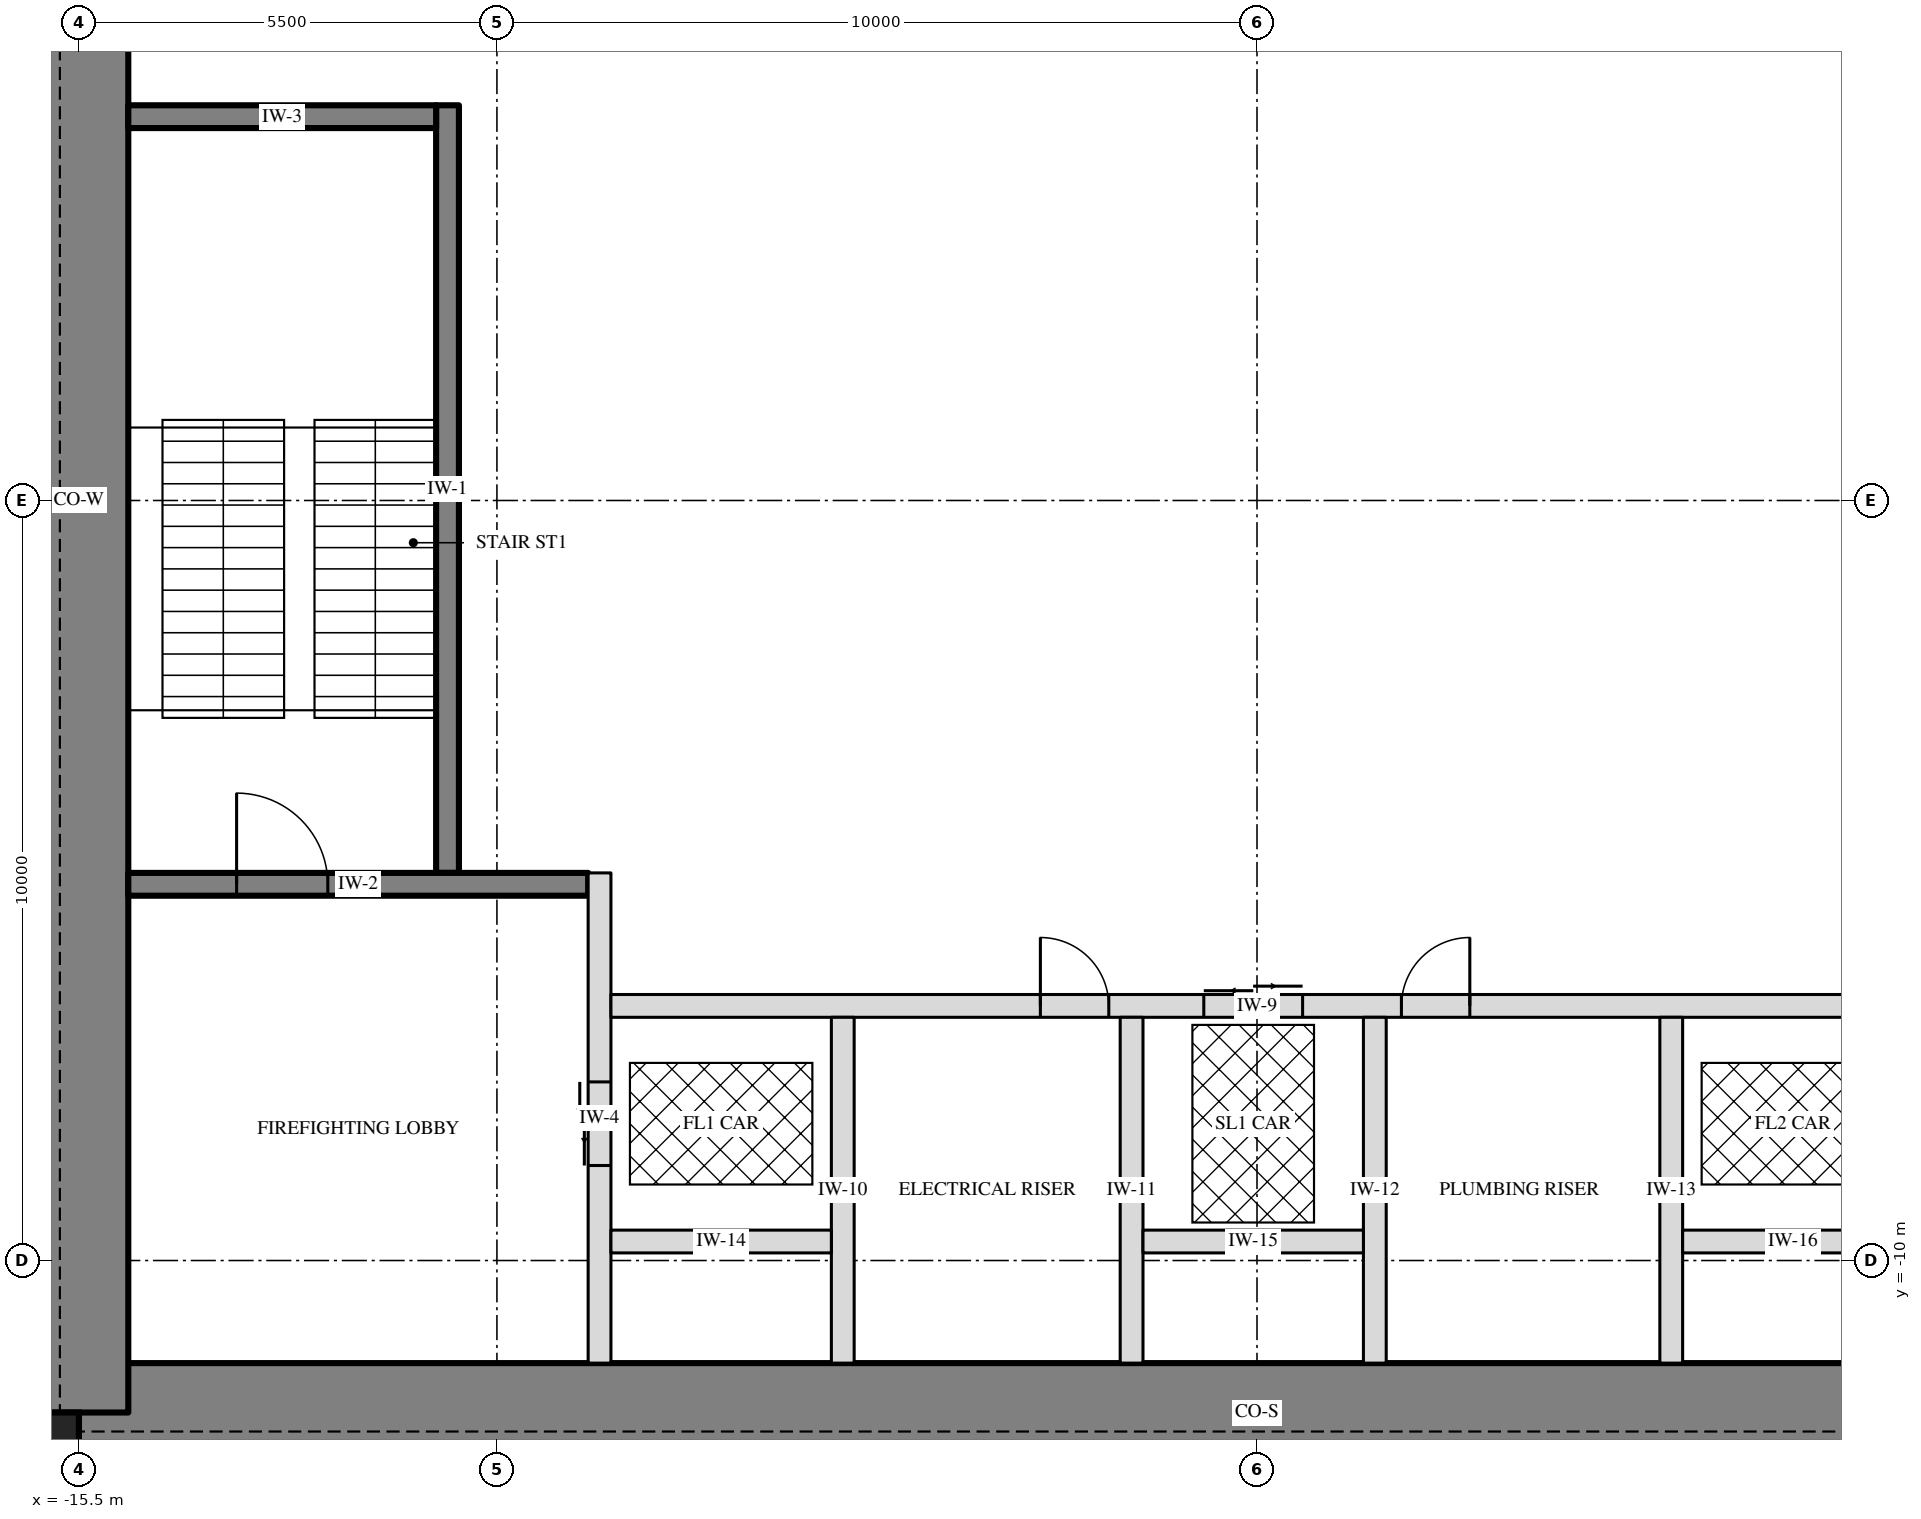
"""IFC4 building model, lengths in metres.
Left out: names, types, materials, properties, quantities, classifications, styles, units other than length and angle.
Written with IfcOpenShell. Run it as: python <this file> out.ifc"""

import sys

from ifc_helpers import new_model, si_unit, direction, frame, frame_2d, origin, origin_2d, place, context, subcontext, project, spatial, rectangle, extrude, element, fill, save


model = new_model("IFC4")
c1 = context("Model", 3, precision=1e-05, world=origin(), true_north=direction((0.0, 1.0)))
c2 = subcontext(c1, "Body", "Model", "MODEL_VIEW")
j1 = project(units=[si_unit("LENGTHUNIT", "METRE"), si_unit("PLANEANGLEUNIT", "RADIAN")], contexts=[c1])
p1 = place(None, origin())
s1 = spatial("IfcSite", under=j1, at=p1, CompositionType="ELEMENT")
p2 = place(p1, origin())
s2 = spatial("IfcBuilding", under=s1, at=p2, CompositionType="ELEMENT")
p3 = place(p2, frame((0.0, 0.0, 353.25)))
s3 = spatial("IfcBuildingStorey", under=s2, at=p3, CompositionType="ELEMENT", Elevation=353.25)
p4 = place(p3, frame((-15.5, -12.0, -0.3), z_axis=(0.0, 0.0, 1.0), x_axis=(1.0, 0.0, 0.0)))
e1 = element("IfcWall", 1, at=p4, inside=s3, PredefinedType="SHEAR", context=c2, shape_type="SweptSolid", body=[
    extrude(rectangle(XDim=31.0, YDim=1.3, at=frame_2d((15.5, 0.0))), origin(), (0.0, 0.0, 1.0), 5.0),
])
p5 = place(p3, frame((-15.5, -12.0, -0.3), z_axis=(0.0, 0.0, 1.0), x_axis=(0.0, 1.0, 0.0)))
e2 = element("IfcWall", 2, at=p5, inside=s3, PredefinedType="SHEAR", context=c2, shape_type="SweptSolid", body=[
    extrude(rectangle(XDim=24.0, YDim=1.3, at=frame_2d((12.0, 0.0))), origin(), (0.0, 0.0, 1.0), 5.0),
])
p6 = place(p5, frame((2.675, 0.0, 0.3)))
e3 = element("IfcOpeningElement", 3, at=p6, cuts=e2, PredefinedType="OPENING", context=c2, shape_type="SweptSolid", body=[
    extrude(rectangle(XDim=1.2, YDim=2.1, at=frame_2d((0.6, 1.05))), frame((0.0, 0.66, 0.0), z_axis=(0.0, -1.0, 0.0), x_axis=(1.0, 0.0, 0.0)), (0.0, 0.0, 1.0), 1.32),
])
p7 = place(p5, frame((20.125, 0.0, 0.3)))
e4 = element("IfcOpeningElement", 4, at=p7, cuts=e2, PredefinedType="OPENING", context=c2, shape_type="SweptSolid", body=[
    extrude(rectangle(XDim=1.8, YDim=2.1, at=frame_2d((0.9, 1.05))), frame((0.0, 0.66, 0.0), z_axis=(0.0, -1.0, 0.0), x_axis=(1.0, 0.0, 0.0)), (0.0, 0.0, 1.0), 1.32),
])
p8 = place(p3, frame((-15.825, -12.325, -0.3), z_axis=(0.0, 0.0, 1.0), x_axis=(1.0, 0.0, 0.0)))
e5 = element("IfcColumn", 5, at=p8, inside=s3, PredefinedType="COLUMN", context=c2, shape_type="SweptSolid", body=[
    extrude(rectangle(XDim=0.65, YDim=0.65, at=origin_2d()), origin(), (0.0, 0.0, 1.0), 5.0),
])
p9 = place(p3, frame((-10.65, -4.9, 0.0), z_axis=(0.0, 0.0, 1.0), x_axis=(0.0, 1.0, 0.0)))
e6 = element("IfcWall", 6, at=p9, inside=s3, PredefinedType="SOLIDWALL", context=c2, shape_type="SweptSolid", body=[
    extrude(rectangle(XDim=10.1, YDim=0.3, at=frame_2d((5.05, 0.0))), origin(), (0.0, 0.0, 1.0), 4.7),
])
p10 = place(p3, frame((-14.85, -5.05, 0.0), z_axis=(0.0, 0.0, 1.0), x_axis=(1.0, 0.0, 0.0)))
e7 = element("IfcWall", 7, at=p10, inside=s3, PredefinedType="SOLIDWALL", context=c2, shape_type="SweptSolid", body=[
    extrude(rectangle(XDim=6.05, YDim=0.3, at=frame_2d((3.025, 0.0))), origin(), (0.0, 0.0, 1.0), 4.7),
])
p11 = place(p10, frame((1.425, 0.0, 0.0)))
e8 = element("IfcOpeningElement", 8, at=p11, cuts=e7, PredefinedType="OPENING", context=c2, shape_type="SweptSolid", body=[
    extrude(rectangle(XDim=1.2, YDim=2.1, at=frame_2d((0.6, 1.05))), frame((0.0, 0.16, 0.0), z_axis=(0.0, -1.0, 0.0), x_axis=(1.0, 0.0, 0.0)), (0.0, 0.0, 1.0), 0.32),
])
p12 = place(p3, frame((-14.85, 5.05, 0.0), z_axis=(0.0, 0.0, 1.0), x_axis=(1.0, 0.0, 0.0)))
e9 = element("IfcWall", 9, at=p12, inside=s3, PredefinedType="SOLIDWALL", context=c2, shape_type="SweptSolid", body=[
    extrude(rectangle(XDim=4.05, YDim=0.3, at=frame_2d((2.025, 0.0))), origin(), (0.0, 0.0, 1.0), 4.7),
])
p13 = place(p3, frame((-8.65, -11.35, 0.0), z_axis=(0.0, 0.0, 1.0), x_axis=(0.0, 1.0, 0.0)))
e10 = element("IfcWall", 10, at=p13, inside=s3, PredefinedType="PARTITIONING", context=c2, shape_type="SweptSolid", body=[
    extrude(rectangle(XDim=6.45, YDim=0.3, at=frame_2d((3.225, 0.0))), origin(), (0.0, 0.0, 1.0), 4.7),
])
p14 = place(p13, frame((2.6, 0.0, 0.0)))
e11 = element("IfcOpeningElement", 11, at=p14, cuts=e10, PredefinedType="OPENING", context=c2, shape_type="SweptSolid", body=[
    extrude(rectangle(XDim=1.1, YDim=2.1, at=frame_2d((0.55, 1.05))), frame((0.0, 0.16, 0.0), z_axis=(0.0, -1.0, 0.0), x_axis=(1.0, 0.0, 0.0)), (0.0, 0.0, 1.0), 0.32),
])
p15 = place(p3, frame((-8.5, -6.65, 0.0), z_axis=(0.0, 0.0, 1.0), x_axis=(1.0, 0.0, 0.0)))
e12 = element("IfcWall", 12, at=p15, inside=s3, PredefinedType="PARTITIONING", context=c2, shape_type="SweptSolid", body=[
    extrude(rectangle(XDim=17.0, YDim=0.3, at=frame_2d((8.5, 0.0))), origin(), (0.0, 0.0, 1.0), 4.7),
])
p16 = place(p15, frame((7.8, 0.0, 0.0)))
e13 = element("IfcOpeningElement", 13, at=p16, cuts=e12, PredefinedType="OPENING", context=c2, shape_type="SweptSolid", body=[
    extrude(rectangle(XDim=1.3, YDim=2.4, at=frame_2d((0.65, 1.2))), frame((0.0, 0.16, 0.0), z_axis=(0.0, -1.0, 0.0), x_axis=(1.0, 0.0, 0.0)), (0.0, 0.0, 1.0), 0.32),
])
p17 = place(p15, frame((5.65, 0.0, 0.0)))
e14 = element("IfcOpeningElement", 14, at=p17, cuts=e12, PredefinedType="OPENING", context=c2, shape_type="SweptSolid", body=[
    extrude(rectangle(XDim=0.9, YDim=2.1, at=frame_2d((0.45, 1.05))), frame((0.0, 0.16, 0.0), z_axis=(0.0, -1.0, 0.0), x_axis=(1.0, 0.0, 0.0)), (0.0, 0.0, 1.0), 0.32),
])
p18 = place(p15, frame((10.4, 0.0, 0.0)))
e15 = element("IfcOpeningElement", 15, at=p18, cuts=e12, PredefinedType="OPENING", context=c2, shape_type="SweptSolid", body=[
    extrude(rectangle(XDim=0.9, YDim=2.1, at=frame_2d((0.45, 1.05))), frame((0.0, 0.16, 0.0), z_axis=(0.0, -1.0, 0.0), x_axis=(1.0, 0.0, 0.0)), (0.0, 0.0, 1.0), 0.32),
])
for number, where, z_axis, x_axis in (
    (16, (-5.45, -11.35, 0.0), (0.0, 0.0, 1.0), (0.0, 1.0, 0.0)),
    (17, (-1.65, -11.35, 0.0), (0.0, 0.0, 1.0), (0.0, 1.0, 0.0)),
    (18, (1.55, -11.35, 0.0), (0.0, 0.0, 1.0), (0.0, 1.0, 0.0)),
    (19, (5.45, -11.35, 0.0), (0.0, 0.0, 1.0), (0.0, 1.0, 0.0)),
):
    element("IfcWall", number, at=place(p3, frame(where, z_axis=z_axis, x_axis=x_axis)), inside=s3, PredefinedType="PARTITIONING", context=c2, shape_type="SweptSolid", body=[
        extrude(rectangle(XDim=4.55, YDim=0.3, at=frame_2d((2.275, 0.0))), origin(), (0.0, 0.0, 1.0), 4.7),
    ])
for number, where, z_axis, x_axis in (
    (20, (-8.5, -9.75, 0.0), (0.0, 0.0, 1.0), (1.0, 0.0, 0.0)),
    (21, (-1.5, -9.75, 0.0), (0.0, 0.0, 1.0), (1.0, 0.0, 0.0)),
    (22, (5.6, -9.75, 0.0), (0.0, 0.0, 1.0), (1.0, 0.0, 0.0)),
):
    element("IfcWall", number, at=place(p3, frame(where, z_axis=z_axis, x_axis=x_axis)), inside=s3, PredefinedType="PARTITIONING", context=c2, shape_type="SweptSolid", body=[
        extrude(rectangle(XDim=2.9, YDim=0.3, at=frame_2d((1.45, 0.0))), origin(), (0.0, 0.0, 1.0), 4.7),
    ])
p19 = place(p3, frame((-4.7, 5.45, 0.0), z_axis=(0.0, 0.0, 1.0), x_axis=(1.0, 0.0, 0.0)))
e23 = element("IfcWall", 23, at=p19, inside=s3, PredefinedType="PARTITIONING", context=c2, shape_type="SweptSolid", body=[
    extrude(rectangle(XDim=9.7, YDim=0.3, at=frame_2d((4.85, 0.0))), origin(), (0.0, 0.0, 1.0), 4.7),
])
for number, where, z_axis, x_axis in (
    (24, (-4.55, 5.6, 0.0), (0.0, 0.0, 1.0), (0.0, 1.0, 0.0)),
    (25, (4.85, 5.6, 0.0), (0.0, 0.0, 1.0), (0.0, 1.0, 0.0)),
):
    element("IfcWall", number, at=place(p3, frame(where, z_axis=z_axis, x_axis=x_axis)), inside=s3, PredefinedType="PARTITIONING", context=c2, shape_type="SweptSolid", body=[
        extrude(rectangle(XDim=2.8, YDim=0.3, at=frame_2d((1.4, 0.0))), origin(), (0.0, 0.0, 1.0), 4.7),
    ])
for number, where, z_axis, x_axis in (
    (26, (-1.4, 5.6, 0.0), (0.0, 0.0, 1.0), (0.0, 1.0, 0.0)),
    (27, (1.7, 5.6, 0.0), (0.0, 0.0, 1.0), (0.0, 1.0, 0.0)),
):
    element("IfcWall", number, at=place(p3, frame(where, z_axis=z_axis, x_axis=x_axis)), inside=s3, PredefinedType="PARTITIONING", context=c2, shape_type="SweptSolid", body=[
        extrude(rectangle(XDim=2.8, YDim=0.2, at=frame_2d((1.4, 0.0))), origin(), (0.0, 0.0, 1.0), 4.7),
    ])
p20 = place(p3, frame((-10.65, 2.0, 0.0), z_axis=(0.0, 0.0, 1.0), x_axis=(1.0, 0.0, 0.0)))
e28 = element("IfcWall", 28, at=p20, inside=s3, PredefinedType="PARTITIONING", context=c2, shape_type="SweptSolid", body=[
    extrude(rectangle(XDim=21.3, YDim=0.3, at=frame_2d((10.65, 0.0))), origin(), (0.0, 0.0, 1.0), 4.7),
])
p21 = place(p20, frame((10.05, 0.0, 0.0)))
e29 = element("IfcOpeningElement", 29, at=p21, cuts=e28, PredefinedType="OPENING", context=c2, shape_type="SweptSolid", body=[
    extrude(rectangle(XDim=1.2, YDim=2.1, at=frame_2d((0.6, 1.05))), frame((0.0, 0.16, 0.0), z_axis=(0.0, -1.0, 0.0), x_axis=(1.0, 0.0, 0.0)), (0.0, 0.0, 1.0), 0.32),
])
p22 = place(p20, frame((18.942, 0.0, 0.0)))
e30 = element("IfcOpeningElement", 30, at=p22, cuts=e28, PredefinedType="OPENING", context=c2, shape_type="SweptSolid", body=[
    extrude(rectangle(XDim=0.9, YDim=2.1, at=frame_2d((0.45, 1.05))), frame((0.0, 0.16, 0.0), z_axis=(0.0, -1.0, 0.0), x_axis=(1.0, 0.0, 0.0)), (0.0, 0.0, 1.0), 0.32),
])
p23 = place(p3, frame((-3.3, -6.65, 0.0), z_axis=(0.0, 0.0, 1.0), x_axis=(0.0, 1.0, 0.0)))
e31 = element("IfcWall", 31, at=p23, inside=s3, PredefinedType="PARTITIONING", context=c2, shape_type="SweptSolid", body=[
    extrude(rectangle(XDim=8.65, YDim=0.3, at=frame_2d((4.325, 0.0))), origin(), (0.0, 0.0, 1.0), 4.7),
])
p24 = place(p23, frame((1.75, 0.0, 0.0)))
e32 = element("IfcOpeningElement", 32, at=p24, cuts=e31, PredefinedType="OPENING", context=c2, shape_type="SweptSolid", body=[
    extrude(rectangle(XDim=0.9, YDim=2.1, at=frame_2d((0.45, 1.05))), frame((0.0, 0.16, 0.0), z_axis=(0.0, -1.0, 0.0), x_axis=(1.0, 0.0, 0.0)), (0.0, 0.0, 1.0), 0.32),
])
p25 = place(p23, frame((6.075, 0.0, 0.0)))
e33 = element("IfcOpeningElement", 33, at=p25, cuts=e31, PredefinedType="OPENING", context=c2, shape_type="SweptSolid", body=[
    extrude(rectangle(XDim=0.9, YDim=2.1, at=frame_2d((0.45, 1.05))), frame((0.0, 0.16, 0.0), z_axis=(0.0, -1.0, 0.0), x_axis=(1.0, 0.0, 0.0)), (0.0, 0.0, 1.0), 0.32),
])
p26 = place(p3, frame((3.3, -6.65, 0.0), z_axis=(0.0, 0.0, 1.0), x_axis=(0.0, 1.0, 0.0)))
e34 = element("IfcWall", 34, at=p26, inside=s3, PredefinedType="PARTITIONING", context=c2, shape_type="SweptSolid", body=[
    extrude(rectangle(XDim=8.65, YDim=0.3, at=frame_2d((4.325, 0.0))), origin(), (0.0, 0.0, 1.0), 4.7),
])
p27 = place(p26, frame((3.875, 0.0, 0.0)))
e35 = element("IfcOpeningElement", 35, at=p27, cuts=e34, PredefinedType="OPENING", context=c2, shape_type="SweptSolid", body=[
    extrude(rectangle(XDim=0.9, YDim=2.1, at=frame_2d((0.45, 1.05))), frame((0.0, 0.16, 0.0), z_axis=(0.0, -1.0, 0.0), x_axis=(1.0, 0.0, 0.0)), (0.0, 0.0, 1.0), 0.32),
])
p28 = place(p3, frame((-10.65, -2.25, 0.0), z_axis=(0.0, 0.0, 1.0), x_axis=(1.0, 0.0, 0.0)))
e36 = element("IfcWall", 36, at=p28, inside=s3, PredefinedType="PARTITIONING", context=c2, shape_type="SweptSolid", body=[
    extrude(rectangle(XDim=7.35, YDim=0.3, at=frame_2d((3.675, 0.0))), origin(), (0.0, 0.0, 1.0), 4.7),
])
p29 = place(p3, frame((6.834, -6.65, 0.0), z_axis=(0.0, 0.0, 1.0), x_axis=(0.0, 1.0, 0.0)))
e37 = element("IfcWall", 37, at=p29, inside=s3, PredefinedType="PARTITIONING", context=c2, shape_type="SweptSolid", body=[
    extrude(rectangle(XDim=8.65, YDim=0.3, at=frame_2d((4.325, 0.0))), origin(), (0.0, 0.0, 1.0), 4.7),
])
p30 = place(p3, frame((-4.85, 5.3, 0.0), z_axis=(0.0, 0.0, 1.0), x_axis=(0.0, 1.0, 0.0)))
e38 = element("IfcWall", 38, at=p30, inside=s3, PredefinedType="PARTITIONING", context=c2, shape_type="SweptSolid", body=[
    extrude(rectangle(XDim=6.05, YDim=0.3, at=frame_2d((3.025, 0.0))), origin(), (0.0, 0.0, 1.0), 4.7),
])
p31 = place(p3, frame((5.15, 5.3, 0.0), z_axis=(0.0, 0.0, 1.0), x_axis=(0.0, 1.0, 0.0)))
e39 = element("IfcWall", 39, at=p31, inside=s3, PredefinedType="PARTITIONING", context=c2, shape_type="SweptSolid", body=[
    extrude(rectangle(XDim=6.05, YDim=0.3, at=frame_2d((3.025, 0.0))), origin(), (0.0, 0.0, 1.0), 4.7),
])
p32 = place(p31, frame((4.225, 0.0, 0.0)))
e40 = element("IfcOpeningElement", 40, at=p32, cuts=e39, PredefinedType="OPENING", context=c2, shape_type="SweptSolid", body=[
    extrude(rectangle(XDim=0.9, YDim=2.1, at=frame_2d((0.45, 1.05))), frame((0.0, 0.16, 0.0), z_axis=(0.0, -1.0, 0.0), x_axis=(1.0, 0.0, 0.0)), (0.0, 0.0, 1.0), 0.32),
])
p33 = place(p11, origin())
e41 = element("IfcDoor", 41, at=p33, inside=s3, OperationType="SINGLE_SWING_LEFT", PredefinedType="DOOR", context=c2, shape_type="SweptSolid", body=[
    extrude(rectangle(XDim=1.2, YDim=2.1, at=frame_2d((0.6, 1.05))), frame((0.0, 0.025, 0.0), z_axis=(0.0, -1.0, 0.0), x_axis=(1.0, 0.0, 0.0)), (0.0, 0.0, 1.0), 0.05),
])
fill(e8, e41)
p34 = place(p6, origin())
e42 = element("IfcDoor", 42, at=p34, inside=s3, OperationType="SINGLE_SWING_LEFT", PredefinedType="DOOR", context=c2, shape_type="SweptSolid", body=[
    extrude(rectangle(XDim=1.2, YDim=2.1, at=frame_2d((0.6, 1.05))), frame((0.0, 0.025, 0.0), z_axis=(0.0, -1.0, 0.0), x_axis=(1.0, 0.0, 0.0)), (0.0, 0.0, 1.0), 0.05),
])
fill(e3, e42)
p35 = place(p14, origin())
e43 = element("IfcDoor", 43, at=p35, inside=s3, OperationType="DOUBLE_DOOR_SLIDING", PredefinedType="DOOR", context=c2, shape_type="SweptSolid", body=[
    extrude(rectangle(XDim=1.1, YDim=2.1, at=frame_2d((0.55, 1.05))), frame((0.0, 0.025, 0.0), z_axis=(0.0, -1.0, 0.0), x_axis=(1.0, 0.0, 0.0)), (0.0, 0.0, 1.0), 0.05),
])
fill(e11, e43)
p36 = place(p16, origin())
e44 = element("IfcDoor", 44, at=p36, inside=s3, OperationType="DOUBLE_DOOR_SLIDING", PredefinedType="DOOR", context=c2, shape_type="SweptSolid", body=[
    extrude(rectangle(XDim=1.3, YDim=2.4, at=frame_2d((0.65, 1.2))), frame((0.0, 0.025, 0.0), z_axis=(0.0, -1.0, 0.0), x_axis=(1.0, 0.0, 0.0)), (0.0, 0.0, 1.0), 0.05),
])
fill(e13, e44)
p37 = place(p21, origin())
e45 = element("IfcDoor", 45, at=p37, inside=s3, OperationType="SINGLE_SWING_LEFT", PredefinedType="DOOR", context=c2, shape_type="SweptSolid", body=[
    extrude(rectangle(XDim=1.2, YDim=2.1, at=frame_2d((0.6, 1.05))), frame((0.0, 0.025, 0.0), z_axis=(0.0, -1.0, 0.0), x_axis=(1.0, 0.0, 0.0)), (0.0, 0.0, 1.0), 0.05),
])
fill(e29, e45)
p38 = place(p17, origin())
e46 = element("IfcDoor", 46, at=p38, inside=s3, OperationType="SINGLE_SWING_LEFT", PredefinedType="DOOR", context=c2, shape_type="SweptSolid", body=[
    extrude(rectangle(XDim=0.9, YDim=2.1, at=frame_2d((0.45, 1.05))), frame((0.0, 0.025, 0.0), z_axis=(0.0, -1.0, 0.0), x_axis=(1.0, 0.0, 0.0)), (0.0, 0.0, 1.0), 0.05),
])
fill(e14, e46)
p39 = place(p18, origin())
e47 = element("IfcDoor", 47, at=p39, inside=s3, OperationType="SINGLE_SWING_RIGHT", PredefinedType="DOOR", context=c2, shape_type="SweptSolid", body=[
    extrude(rectangle(XDim=0.9, YDim=2.1, at=frame_2d((0.45, 1.05))), frame((0.0, 0.025, 0.0), z_axis=(0.0, -1.0, 0.0), x_axis=(1.0, 0.0, 0.0)), (0.0, 0.0, 1.0), 0.05),
])
fill(e15, e47)
p40 = place(p24, origin())
e48 = element("IfcDoor", 48, at=p40, inside=s3, OperationType="SINGLE_SWING_LEFT", PredefinedType="DOOR", context=c2, shape_type="SweptSolid", body=[
    extrude(rectangle(XDim=0.9, YDim=2.1, at=frame_2d((0.45, 1.05))), frame((0.0, 0.025, 0.0), z_axis=(0.0, -1.0, 0.0), x_axis=(1.0, 0.0, 0.0)), (0.0, 0.0, 1.0), 0.05),
])
fill(e32, e48)
p41 = place(p25, origin())
e49 = element("IfcDoor", 49, at=p41, inside=s3, OperationType="SINGLE_SWING_LEFT", PredefinedType="DOOR", context=c2, shape_type="SweptSolid", body=[
    extrude(rectangle(XDim=0.9, YDim=2.1, at=frame_2d((0.45, 1.05))), frame((0.0, 0.025, 0.0), z_axis=(0.0, -1.0, 0.0), x_axis=(1.0, 0.0, 0.0)), (0.0, 0.0, 1.0), 0.05),
])
fill(e33, e49)
p42 = place(p27, origin())
e50 = element("IfcDoor", 50, at=p42, inside=s3, OperationType="SINGLE_SWING_LEFT", PredefinedType="DOOR", context=c2, shape_type="SweptSolid", body=[
    extrude(rectangle(XDim=0.9, YDim=2.1, at=frame_2d((0.45, 1.05))), frame((0.0, 0.025, 0.0), z_axis=(0.0, -1.0, 0.0), x_axis=(1.0, 0.0, 0.0)), (0.0, 0.0, 1.0), 0.05),
])
fill(e35, e50)
save(model, sys.argv[1])
